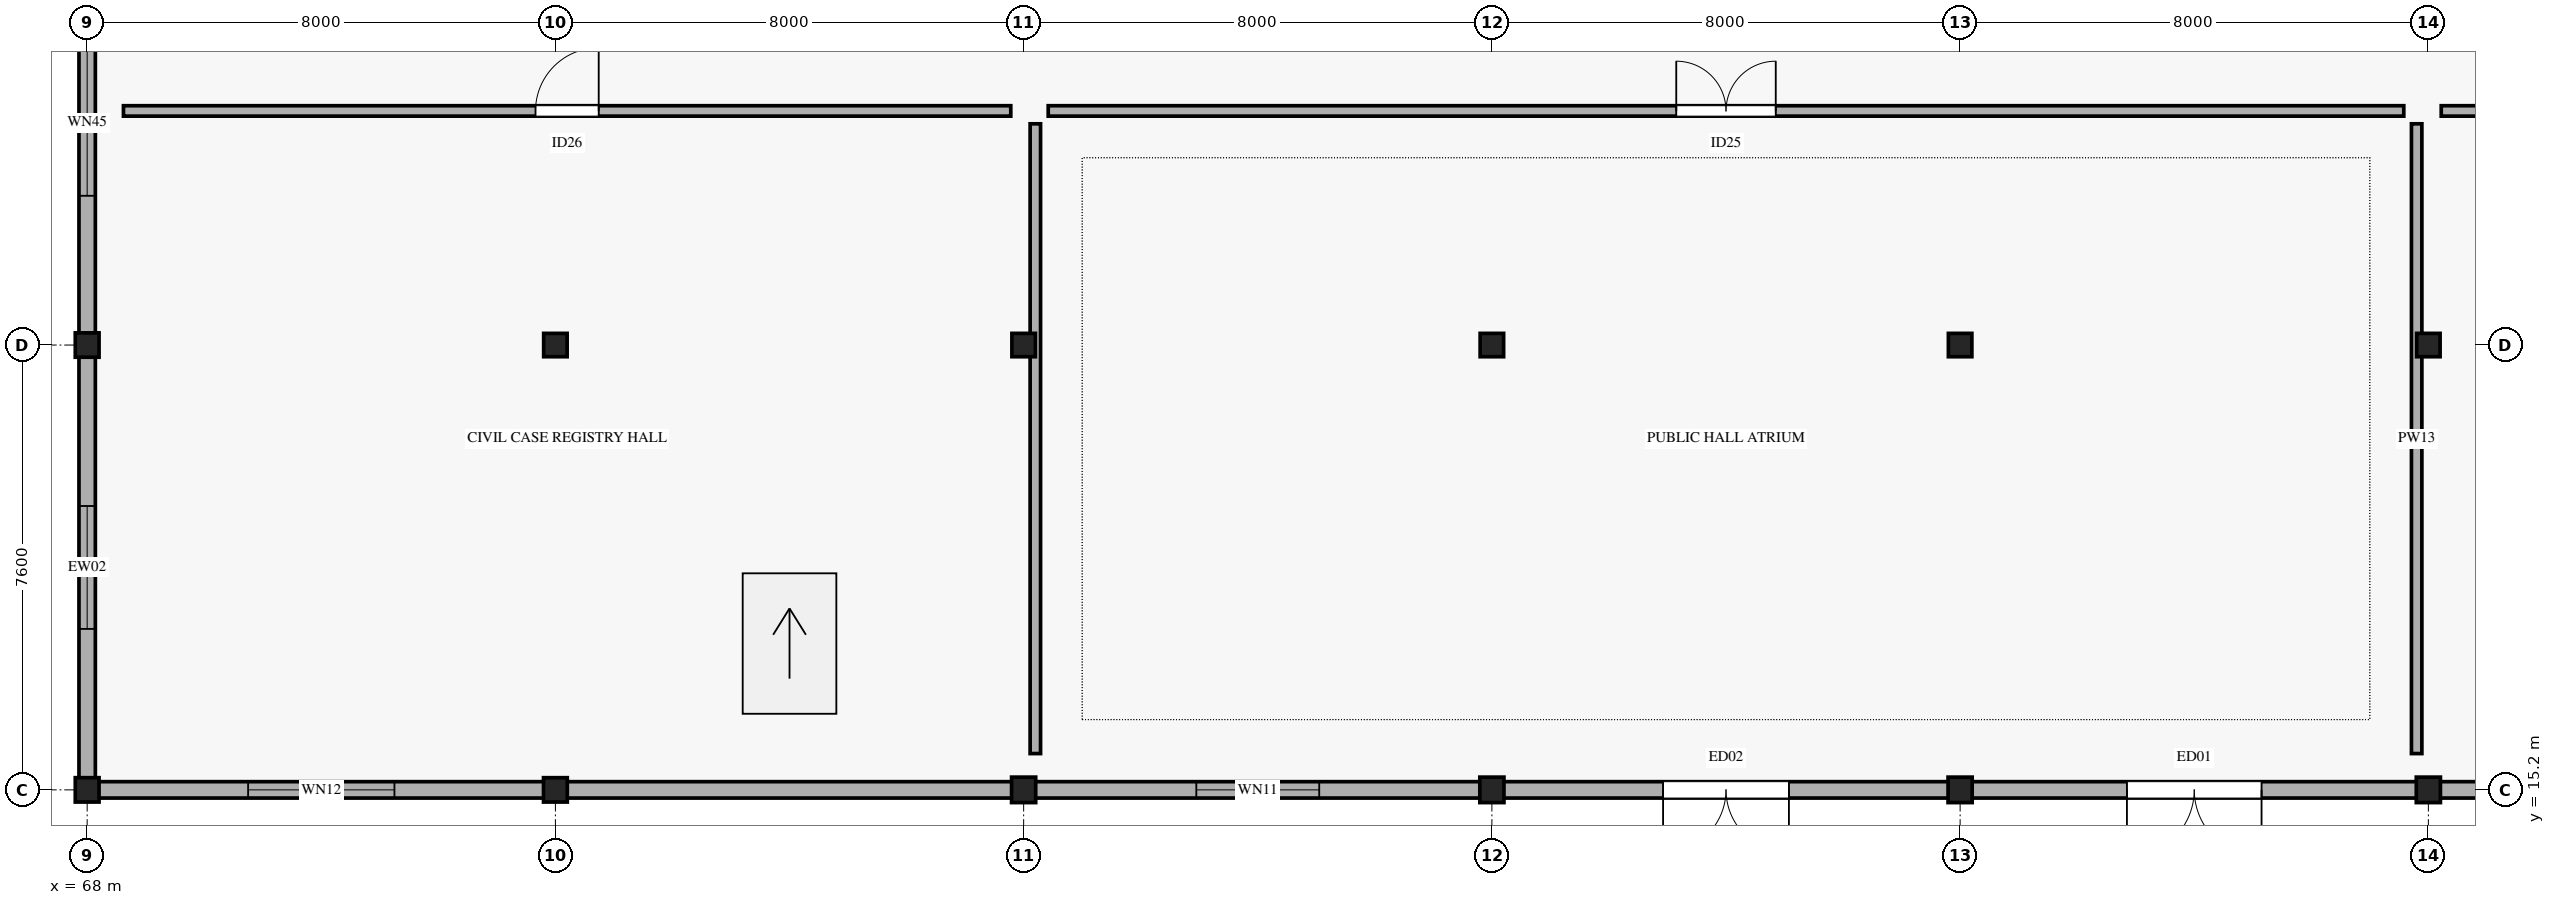
"""IFC4 building model, lengths in metres.
Left out: names, types, materials, properties, quantities, classifications, styles, units other than length and angle.
Written with IfcOpenShell. Run it as: python <this file> out.ifc"""

import sys

from ifc_helpers import new_model, si_unit, direction, frame, frame_2d, origin, origin_2d, place, context, subcontext, project, spatial, rectangle, i_section, extrude, element, fill, save


model = new_model("IFC4")
c1 = context("Model", 3, precision=1e-05, world=origin(), true_north=direction((0.0, 1.0)))
c2 = subcontext(c1, "Body", "Model", "MODEL_VIEW")
j1 = project(units=[si_unit("LENGTHUNIT", "METRE"), si_unit("PLANEANGLEUNIT", "RADIAN")], contexts=[c1])
p1 = place(None, origin())
s1 = spatial("IfcSite", under=j1, at=p1, CompositionType="ELEMENT")
p2 = place(p1, origin())
s2 = spatial("IfcBuilding", under=s1, at=p2, CompositionType="ELEMENT")
p3 = place(p2, origin())
s3 = spatial("IfcBuildingStorey", under=s2, at=p3, CompositionType="ELEMENT", Elevation=0.0)
for number, where, z_axis, x_axis in (
    (1, (68.0, 15.2, 0.0), (0.0, 0.0, 1.0), (1.0, 0.0, 0.0)),
    (2, (68.0, 22.8, 0.0), (0.0, 0.0, 1.0), (1.0, 0.0, 0.0)),
    (3, (76.0, 15.2, 0.0), (0.0, 0.0, 1.0), (1.0, 0.0, 0.0)),
):
    element("IfcColumn", number, at=place(p3, frame(where, z_axis=z_axis, x_axis=x_axis)), inside=s3, PredefinedType="COLUMN", context=c2, shape_type="SweptSolid", body=[
        extrude(i_section(OverallWidth=0.406, OverallDepth=0.416, WebThickness=0.03, FlangeThickness=0.048, FilletRadius=0.015, at=origin_2d()), origin(), (0.0, 0.0, 1.0), 5.185),
    ])
p4 = place(p3, frame((76.0, 22.8, 0.0), z_axis=(0.0, 0.0, 1.0), x_axis=(1.0, 0.0, 0.0)))
e4 = element("IfcColumn", 4, at=p4, inside=s3, PredefinedType="COLUMN", context=c2, shape_type="SweptSolid", body=[
    extrude(i_section(OverallWidth=0.401, OverallDepth=0.399, WebThickness=0.025, FlangeThickness=0.04, FilletRadius=0.015, at=origin_2d()), origin(), (0.0, 0.0, 1.0), 5.185),
])
p5 = place(p3, frame((84.0, 15.2, 0.0), z_axis=(0.0, 0.0, 1.0), x_axis=(1.0, 0.0, 0.0)))
e5 = element("IfcColumn", 5, at=p5, inside=s3, PredefinedType="COLUMN", context=c2, shape_type="SweptSolid", body=[
    extrude(i_section(OverallWidth=0.412, OverallDepth=0.435, WebThickness=0.036, FlangeThickness=0.057, FilletRadius=0.015, at=origin_2d()), origin(), (0.0, 0.0, 1.0), 5.185),
])
p6 = place(p3, frame((84.0, 22.8, 0.0), z_axis=(0.0, 0.0, 1.0), x_axis=(1.0, 0.0, 0.0)))
e6 = element("IfcColumn", 6, at=p6, inside=s3, PredefinedType="COLUMN", context=c2, shape_type="SweptSolid", body=[
    extrude(i_section(OverallWidth=0.401, OverallDepth=0.399, WebThickness=0.025, FlangeThickness=0.04, FilletRadius=0.015, at=origin_2d()), origin(), (0.0, 0.0, 1.0), 5.185),
])
p7 = place(p3, frame((92.0, 15.2, 0.0), z_axis=(0.0, 0.0, 1.0), x_axis=(1.0, 0.0, 0.0)))
e7 = element("IfcColumn", 7, at=p7, inside=s3, PredefinedType="COLUMN", context=c2, shape_type="SweptSolid", body=[
    extrude(i_section(OverallWidth=0.412, OverallDepth=0.435, WebThickness=0.036, FlangeThickness=0.057, FilletRadius=0.015, at=origin_2d()), origin(), (0.0, 0.0, 1.0), 5.185),
])
p8 = place(p3, frame((92.0, 22.8, 0.0), z_axis=(0.0, 0.0, 1.0), x_axis=(1.0, 0.0, 0.0)))
e8 = element("IfcColumn", 8, at=p8, inside=s3, PredefinedType="COLUMN", context=c2, shape_type="SweptSolid", body=[
    extrude(i_section(OverallWidth=0.401, OverallDepth=0.399, WebThickness=0.025, FlangeThickness=0.04, FilletRadius=0.015, at=origin_2d()), origin(), (0.0, 0.0, 1.0), 5.185),
])
p9 = place(p3, frame((100.0, 15.2, 0.0), z_axis=(0.0, 0.0, 1.0), x_axis=(1.0, 0.0, 0.0)))
e9 = element("IfcColumn", 9, at=p9, inside=s3, PredefinedType="COLUMN", context=c2, shape_type="SweptSolid", body=[
    extrude(i_section(OverallWidth=0.412, OverallDepth=0.435, WebThickness=0.036, FlangeThickness=0.057, FilletRadius=0.015, at=origin_2d()), origin(), (0.0, 0.0, 1.0), 5.185),
])
p10 = place(p3, frame((100.0, 22.8, 0.0), z_axis=(0.0, 0.0, 1.0), x_axis=(1.0, 0.0, 0.0)))
e10 = element("IfcColumn", 10, at=p10, inside=s3, PredefinedType="COLUMN", context=c2, shape_type="SweptSolid", body=[
    extrude(i_section(OverallWidth=0.401, OverallDepth=0.399, WebThickness=0.025, FlangeThickness=0.04, FilletRadius=0.015, at=origin_2d()), origin(), (0.0, 0.0, 1.0), 5.185),
])
p11 = place(p3, frame((108.0, 15.2, 0.0), z_axis=(0.0, 0.0, 1.0), x_axis=(1.0, 0.0, 0.0)))
e11 = element("IfcColumn", 11, at=p11, inside=s3, PredefinedType="COLUMN", context=c2, shape_type="SweptSolid", body=[
    extrude(i_section(OverallWidth=0.412, OverallDepth=0.435, WebThickness=0.036, FlangeThickness=0.057, FilletRadius=0.015, at=origin_2d()), origin(), (0.0, 0.0, 1.0), 5.185),
])
p12 = place(p3, frame((108.0, 22.8, 0.0), z_axis=(0.0, 0.0, 1.0), x_axis=(1.0, 0.0, 0.0)))
e12 = element("IfcColumn", 12, at=p12, inside=s3, PredefinedType="COLUMN", context=c2, shape_type="SweptSolid", body=[
    extrude(i_section(OverallWidth=0.401, OverallDepth=0.399, WebThickness=0.025, FlangeThickness=0.04, FilletRadius=0.015, at=origin_2d()), origin(), (0.0, 0.0, 1.0), 5.185),
])
p13 = place(p3, frame((68.0, 15.18, 0.0), z_axis=(0.0, 0.0, 1.0), x_axis=(0.0, 1.0, 0.0)))
e13 = element("IfcWall", 13, at=p13, inside=s3, PredefinedType="STANDARD", context=c2, shape_type="SweptSolid", body=[
    extrude(rectangle(XDim=7.64, YDim=0.28, at=frame_2d((3.82, 0.0))), origin(), (0.0, 0.0, 1.0), 4.25),
])
p14 = place(p13, frame((2.77, 0.0, 0.75)))
e14 = element("IfcOpeningElement", 14, at=p14, cuts=e13, PredefinedType="OPENING", context=c2, shape_type="SweptSolid", body=[
    extrude(rectangle(XDim=2.1, YDim=1.65, at=frame_2d((1.05, 0.825))), frame((0.0, 0.15, 0.0), z_axis=(0.0, -1.0, 0.0), x_axis=(1.0, 0.0, 0.0)), (0.0, 0.0, 1.0), 0.3),
])
p15 = place(p3, frame((68.0, 22.78, 0.0), z_axis=(0.0, 0.0, 1.0), x_axis=(0.0, 1.0, 0.0)))
e15 = element("IfcWall", 15, at=p15, inside=s3, PredefinedType="STANDARD", context=c2, shape_type="SweptSolid", body=[
    extrude(rectangle(XDim=7.64, YDim=0.28, at=frame_2d((3.82, 0.0))), origin(), (0.0, 0.0, 1.0), 4.25),
])
p16 = place(p15, frame((2.57, 0.0, 0.75)))
e16 = element("IfcOpeningElement", 16, at=p16, cuts=e15, PredefinedType="OPENING", context=c2, shape_type="SweptSolid", body=[
    extrude(rectangle(XDim=2.5, YDim=1.65, at=frame_2d((1.25, 0.825))), frame((0.0, 0.15, 0.0), z_axis=(0.0, -1.0, 0.0), x_axis=(1.0, 0.0, 0.0)), (0.0, 0.0, 1.0), 0.3),
])
p17 = place(p3, frame((116.02, 15.2, 0.0), z_axis=(0.0, 0.0, 1.0), x_axis=(-1.0, 0.0, 0.0)))
e17 = element("IfcWall", 17, at=p17, inside=s3, PredefinedType="STANDARD", context=c2, shape_type="SweptSolid", body=[
    extrude(rectangle(XDim=8.04, YDim=0.28, at=frame_2d((4.02, 0.0))), origin(), (0.0, 0.0, 1.0), 4.25),
])
p18 = place(p17, frame((3.145, 0.0, 0.75)))
e18 = element("IfcOpeningElement", 18, at=p18, cuts=e17, PredefinedType="OPENING", context=c2, shape_type="SweptSolid", body=[
    extrude(rectangle(XDim=1.75, YDim=2.15, at=frame_2d((0.875, 1.075))), frame((0.0, 0.15, 0.0), z_axis=(0.0, -1.0, 0.0), x_axis=(1.0, 0.0, 0.0)), (0.0, 0.0, 1.0), 0.3),
])
p19 = place(p3, frame((108.02, 15.2, 0.0), z_axis=(0.0, 0.0, 1.0), x_axis=(-1.0, 0.0, 0.0)))
e19 = element("IfcWall", 19, at=p19, inside=s3, PredefinedType="STANDARD", context=c2, shape_type="SweptSolid", body=[
    extrude(rectangle(XDim=8.04, YDim=0.28, at=frame_2d((4.02, 0.0))), origin(), (0.0, 0.0, 1.0), 4.25),
])
p20 = place(p19, frame((2.87, 0.0, 0.0)))
e20 = element("IfcOpeningElement", 20, at=p20, cuts=e19, PredefinedType="OPENING", context=c2, shape_type="SweptSolid", body=[
    extrude(rectangle(XDim=2.3, YDim=2.6, at=frame_2d((1.15, 1.3))), frame((0.0, 0.15, 0.0), z_axis=(0.0, -1.0, 0.0), x_axis=(1.0, 0.0, 0.0)), (0.0, 0.0, 1.0), 0.3),
])
p21 = place(p3, frame((100.02, 15.2, 0.0), z_axis=(0.0, 0.0, 1.0), x_axis=(-1.0, 0.0, 0.0)))
e21 = element("IfcWall", 21, at=p21, inside=s3, PredefinedType="STANDARD", context=c2, shape_type="SweptSolid", body=[
    extrude(rectangle(XDim=8.04, YDim=0.28, at=frame_2d((4.02, 0.0))), origin(), (0.0, 0.0, 1.0), 4.25),
])
p22 = place(p21, frame((2.945, 0.0, 0.0)))
e22 = element("IfcOpeningElement", 22, at=p22, cuts=e21, PredefinedType="OPENING", context=c2, shape_type="SweptSolid", body=[
    extrude(rectangle(XDim=2.15, YDim=2.55, at=frame_2d((1.075, 1.275))), frame((0.0, 0.15, 0.0), z_axis=(0.0, -1.0, 0.0), x_axis=(1.0, 0.0, 0.0)), (0.0, 0.0, 1.0), 0.3),
])
p23 = place(p3, frame((92.02, 15.2, 0.0), z_axis=(0.0, 0.0, 1.0), x_axis=(-1.0, 0.0, 0.0)))
e23 = element("IfcWall", 23, at=p23, inside=s3, PredefinedType="STANDARD", context=c2, shape_type="SweptSolid", body=[
    extrude(rectangle(XDim=8.04, YDim=0.28, at=frame_2d((4.02, 0.0))), origin(), (0.0, 0.0, 1.0), 4.25),
])
p24 = place(p23, frame((2.97, 0.0, 0.75)))
e24 = element("IfcOpeningElement", 24, at=p24, cuts=e23, PredefinedType="OPENING", context=c2, shape_type="SweptSolid", body=[
    extrude(rectangle(XDim=2.1, YDim=2.15, at=frame_2d((1.05, 1.075))), frame((0.0, 0.15, 0.0), z_axis=(0.0, -1.0, 0.0), x_axis=(1.0, 0.0, 0.0)), (0.0, 0.0, 1.0), 0.3),
])
p25 = place(p3, frame((84.02, 15.2, 0.0), z_axis=(0.0, 0.0, 1.0), x_axis=(-1.0, 0.0, 0.0)))
e25 = element("IfcWall", 25, at=p25, inside=s3, PredefinedType="STANDARD", context=c2, shape_type="SweptSolid", body=[
    extrude(rectangle(XDim=8.04, YDim=0.28, at=frame_2d((4.02, 0.0))), origin(), (0.0, 0.0, 1.0), 4.25),
])
p26 = place(p3, frame((76.02, 15.2, 0.0), z_axis=(0.0, 0.0, 1.0), x_axis=(-1.0, 0.0, 0.0)))
e26 = element("IfcWall", 26, at=p26, inside=s3, PredefinedType="STANDARD", context=c2, shape_type="SweptSolid", body=[
    extrude(rectangle(XDim=8.04, YDim=0.28, at=frame_2d((4.02, 0.0))), origin(), (0.0, 0.0, 1.0), 4.25),
])
p27 = place(p26, frame((2.77, 0.0, 0.75)))
e27 = element("IfcOpeningElement", 27, at=p27, cuts=e26, PredefinedType="OPENING", context=c2, shape_type="SweptSolid", body=[
    extrude(rectangle(XDim=2.5, YDim=2.15, at=frame_2d((1.25, 1.075))), frame((0.0, 0.15, 0.0), z_axis=(0.0, -1.0, 0.0), x_axis=(1.0, 0.0, 0.0)), (0.0, 0.0, 1.0), 0.3),
])
p28 = place(p3, frame((84.42, 26.8, 0.0), z_axis=(0.0, 0.0, 1.0), x_axis=(1.0, 0.0, 0.0)))
e28 = element("IfcWall", 28, at=p28, inside=s3, PredefinedType="PARTITIONING", context=c2, shape_type="SweptSolid", body=[
    extrude(rectangle(XDim=23.16, YDim=0.178, at=frame_2d((11.58, 0.0))), origin(), (0.0, 0.0, 1.0), 4.05),
])
p29 = place(p28, frame((10.73, 0.0, 0.0)))
e29 = element("IfcOpeningElement", 29, at=p29, cuts=e28, PredefinedType="OPENING", context=c2, shape_type="SweptSolid", body=[
    extrude(rectangle(XDim=1.7, YDim=2.3, at=frame_2d((0.85, 1.15))), frame((0.0, 0.099, 0.0), z_axis=(0.0, -1.0, 0.0), x_axis=(1.0, 0.0, 0.0)), (0.0, 0.0, 1.0), 0.198),
])
for number, where, z_axis, x_axis in (
    (30, (107.8, 15.82, 0.0), (0.0, 0.0, 1.0), (0.0, 1.0, 0.0)),
    (31, (84.2, 15.82, 0.0), (0.0, 0.0, 1.0), (0.0, 1.0, 0.0)),
):
    element("IfcWall", number, at=place(p3, frame(where, z_axis=z_axis, x_axis=x_axis)), inside=s3, PredefinedType="PARTITIONING", context=c2, shape_type="SweptSolid", body=[
        extrude(rectangle(XDim=10.76, YDim=0.178, at=frame_2d((5.38, 0.0))), origin(), (0.0, 0.0, 1.0), 4.05),
    ])
p30 = place(p3, frame((68.62, 26.8, 0.0), z_axis=(0.0, 0.0, 1.0), x_axis=(1.0, 0.0, 0.0)))
e32 = element("IfcWall", 32, at=p30, inside=s3, PredefinedType="PARTITIONING", context=c2, shape_type="SweptSolid", body=[
    extrude(rectangle(XDim=15.16, YDim=0.178, at=frame_2d((7.58, 0.0))), origin(), (0.0, 0.0, 1.0), 4.05),
])
p31 = place(p30, frame((7.04, 0.0, 0.0)))
e33 = element("IfcOpeningElement", 33, at=p31, cuts=e32, PredefinedType="OPENING", context=c2, shape_type="SweptSolid", body=[
    extrude(rectangle(XDim=1.08, YDim=2.25, at=frame_2d((0.54, 1.125))), frame((0.0, 0.099, 0.0), z_axis=(0.0, -1.0, 0.0), x_axis=(1.0, 0.0, 0.0)), (0.0, 0.0, 1.0), 0.198),
])
p32 = place(p3, frame((108.22, 26.8, 0.0), z_axis=(0.0, 0.0, 1.0), x_axis=(1.0, 0.0, 0.0)))
e34 = element("IfcWall", 34, at=p32, inside=s3, PredefinedType="PARTITIONING", context=c2, shape_type="SweptSolid", body=[
    extrude(rectangle(XDim=15.16, YDim=0.178, at=frame_2d((7.58, 0.0))), origin(), (0.0, 0.0, 1.0), 4.05),
])
p33 = place(p32, frame((6.99, 0.0, 0.0)))
e35 = element("IfcOpeningElement", 35, at=p33, cuts=e34, PredefinedType="OPENING", context=c2, shape_type="SweptSolid", body=[
    extrude(rectangle(XDim=1.18, YDim=2.3, at=frame_2d((0.59, 1.15))), frame((0.0, 0.099, 0.0), z_axis=(0.0, -1.0, 0.0), x_axis=(1.0, 0.0, 0.0)), (0.0, 0.0, 1.0), 0.198),
])
p34 = place(p14, origin())
e36 = element("IfcWindow", 36, at=p34, inside=s3, PartitioningType="SINGLE_PANEL", PredefinedType="WINDOW", context=c2, shape_type="SweptSolid", body=[
    extrude(rectangle(XDim=2.1, YDim=1.65, at=frame_2d((1.05, 0.825))), frame((0.0, 0.03, 0.0), z_axis=(0.0, -1.0, 0.0), x_axis=(1.0, 0.0, 0.0)), (0.0, 0.0, 1.0), 0.06),
])
fill(e14, e36)
p35 = place(p16, origin())
e37 = element("IfcWindow", 37, at=p35, inside=s3, PartitioningType="SINGLE_PANEL", PredefinedType="WINDOW", context=c2, shape_type="SweptSolid", body=[
    extrude(rectangle(XDim=2.5, YDim=1.65, at=frame_2d((1.25, 0.825))), frame((0.0, 0.03, 0.0), z_axis=(0.0, -1.0, 0.0), x_axis=(1.0, 0.0, 0.0)), (0.0, 0.0, 1.0), 0.06),
])
fill(e16, e37)
p36 = place(p20, origin())
e38 = element("IfcDoor", 38, at=p36, inside=s3, OperationType="DOUBLE_DOOR_SINGLE_SWING", PredefinedType="DOOR", context=c2, shape_type="SweptSolid", body=[
    extrude(rectangle(XDim=2.3, YDim=2.6, at=frame_2d((1.15, 1.3))), frame((0.0, 0.025, 0.0), z_axis=(0.0, -1.0, 0.0), x_axis=(1.0, 0.0, 0.0)), (0.0, 0.0, 1.0), 0.05),
])
fill(e20, e38)
p37 = place(p22, origin())
e39 = element("IfcDoor", 39, at=p37, inside=s3, OperationType="DOUBLE_DOOR_SINGLE_SWING", PredefinedType="DOOR", context=c2, shape_type="SweptSolid", body=[
    extrude(rectangle(XDim=2.15, YDim=2.55, at=frame_2d((1.075, 1.275))), frame((0.0, 0.025, 0.0), z_axis=(0.0, -1.0, 0.0), x_axis=(1.0, 0.0, 0.0)), (0.0, 0.0, 1.0), 0.05),
])
fill(e22, e39)
p38 = place(p24, origin())
e40 = element("IfcWindow", 40, at=p38, inside=s3, PartitioningType="SINGLE_PANEL", PredefinedType="WINDOW", context=c2, shape_type="SweptSolid", body=[
    extrude(rectangle(XDim=2.1, YDim=2.15, at=frame_2d((1.05, 1.075))), frame((0.0, 0.03, 0.0), z_axis=(0.0, -1.0, 0.0), x_axis=(1.0, 0.0, 0.0)), (0.0, 0.0, 1.0), 0.06),
])
fill(e24, e40)
p39 = place(p27, origin())
e41 = element("IfcWindow", 41, at=p39, inside=s3, PartitioningType="SINGLE_PANEL", PredefinedType="WINDOW", context=c2, shape_type="SweptSolid", body=[
    extrude(rectangle(XDim=2.5, YDim=2.15, at=frame_2d((1.25, 1.075))), frame((0.0, 0.03, 0.0), z_axis=(0.0, -1.0, 0.0), x_axis=(1.0, 0.0, 0.0)), (0.0, 0.0, 1.0), 0.06),
])
fill(e27, e41)
p40 = place(p29, origin())
e42 = element("IfcDoor", 42, at=p40, inside=s3, OperationType="DOUBLE_DOOR_SINGLE_SWING", PredefinedType="DOOR", context=c2, shape_type="SweptSolid", body=[
    extrude(rectangle(XDim=1.7, YDim=2.3, at=frame_2d((0.85, 1.15))), frame((0.0, 0.025, 0.0), z_axis=(0.0, -1.0, 0.0), x_axis=(1.0, 0.0, 0.0)), (0.0, 0.0, 1.0), 0.05),
])
fill(e29, e42)
p41 = place(p31, origin())
e43 = element("IfcDoor", 43, at=p41, inside=s3, OperationType="SINGLE_SWING_RIGHT", PredefinedType="DOOR", context=c2, shape_type="SweptSolid", body=[
    extrude(rectangle(XDim=1.08, YDim=2.25, at=frame_2d((0.54, 1.125))), frame((0.0, 0.025, 0.0), z_axis=(0.0, -1.0, 0.0), x_axis=(1.0, 0.0, 0.0)), (0.0, 0.0, 1.0), 0.05),
])
fill(e33, e43)
save(model, sys.argv[1])
